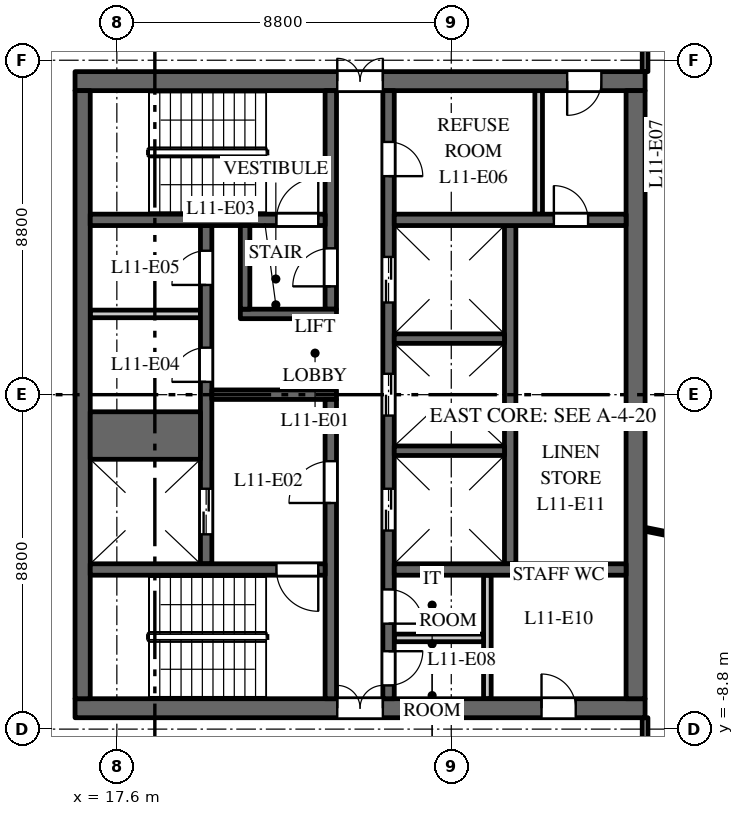
"""IFC4 building model, lengths in metres.
Left out: names, types, materials, properties, quantities, classifications, styles, units other than length and angle.
Written with IfcOpenShell. Run it as: python <this file> out.ifc"""

import sys

from ifc_helpers import new_model, si_unit, direction, frame, frame_2d, origin, place, context, subcontext, project, spatial, rectangle, extrude, element, fill, save


model = new_model("IFC4")
c1 = context("Model", 3, precision=1e-05, world=origin(), true_north=direction((0.0, 1.0)))
c2 = subcontext(c1, "Body", "Model", "MODEL_VIEW")
j1 = project(units=[si_unit("LENGTHUNIT", "METRE"), si_unit("PLANEANGLEUNIT", "RADIAN")], contexts=[c1])
p1 = place(None, origin())
s1 = spatial("IfcSite", under=j1, at=p1, CompositionType="ELEMENT")
p2 = place(p1, origin())
s2 = spatial("IfcBuilding", under=s1, at=p2, CompositionType="ELEMENT")
p3 = place(p2, frame((0.0, 0.0, 54.5)))
s3 = spatial("IfcBuildingStorey", under=s2, at=p3, CompositionType="ELEMENT", Elevation=54.5)
p4 = place(p3, frame((16.5, 8.25, 0.0), z_axis=(0.0, 0.0, 1.0), x_axis=(1.0, 0.0, 0.0)))
e1 = element("IfcWall", 1, at=p4, inside=s3, PredefinedType="SHEAR", context=c2, shape_type="SweptSolid", body=[
    extrude(rectangle(XDim=15.0, YDim=0.5, at=frame_2d((7.5, 0.0))), origin(), (0.0, 0.0, 1.0), 3.7),
])
p5 = place(p4, frame((6.9, 0.0, 0.0)))
e2 = element("IfcOpeningElement", 2, at=p5, cuts=e1, PredefinedType="OPENING", context=c2, shape_type="SweptSolid", body=[
    extrude(rectangle(XDim=1.2, YDim=2.1, at=frame_2d((0.6, 1.05))), frame((0.0, 0.26, 0.0), z_axis=(0.0, -1.0, 0.0), x_axis=(1.0, 0.0, 0.0)), (0.0, 0.0, 1.0), 0.52),
])
p6 = place(p4, frame((12.95, 0.0, 0.0)))
e3 = element("IfcOpeningElement", 3, at=p6, cuts=e1, PredefinedType="OPENING", context=c2, shape_type="SweptSolid", body=[
    extrude(rectangle(XDim=0.9, YDim=2.1, at=frame_2d((0.45, 1.05))), frame((0.0, 0.26, 0.0), z_axis=(0.0, -1.0, 0.0), x_axis=(1.0, 0.0, 0.0)), (0.0, 0.0, 1.0), 0.52),
])
p7 = place(p3, frame((16.5, -8.25, 0.0), z_axis=(0.0, 0.0, 1.0), x_axis=(1.0, 0.0, 0.0)))
e4 = element("IfcWall", 4, at=p7, inside=s3, PredefinedType="SHEAR", context=c2, shape_type="SweptSolid", body=[
    extrude(rectangle(XDim=15.0, YDim=0.5, at=frame_2d((7.5, 0.0))), origin(), (0.0, 0.0, 1.0), 3.7),
])
p8 = place(p7, frame((6.9, 0.0, 0.0)))
e5 = element("IfcOpeningElement", 5, at=p8, cuts=e4, PredefinedType="OPENING", context=c2, shape_type="SweptSolid", body=[
    extrude(rectangle(XDim=1.2, YDim=2.1, at=frame_2d((0.6, 1.05))), frame((0.0, 0.26, 0.0), z_axis=(0.0, -1.0, 0.0), x_axis=(1.0, 0.0, 0.0)), (0.0, 0.0, 1.0), 0.52),
])
p9 = place(p7, frame((12.275, 0.0, 0.0)))
e6 = element("IfcOpeningElement", 6, at=p9, cuts=e4, PredefinedType="OPENING", context=c2, shape_type="SweptSolid", body=[
    extrude(rectangle(XDim=0.9, YDim=2.1, at=frame_2d((0.45, 1.05))), frame((0.0, 0.26, 0.0), z_axis=(0.0, -1.0, 0.0), x_axis=(1.0, 0.0, 0.0)), (0.0, 0.0, 1.0), 0.52),
])
p10 = place(p3, frame((16.9, 2.125, 0.0), z_axis=(0.0, 0.0, 1.0), x_axis=(1.0, 0.0, 0.0)))
e7 = element("IfcWall", 7, at=p10, inside=s3, PredefinedType="PARTITIONING", context=c2, shape_type="SweptSolid", body=[
    extrude(rectangle(XDim=2.9, YDim=0.2, at=frame_2d((1.45, 0.0))), origin(), (0.0, 0.0, 1.0), 3.7),
])
p11 = place(p3, frame((27.95, -4.45, 0.0), z_axis=(0.0, 0.0, 1.0), x_axis=(0.0, 1.0, 0.0)))
e8 = element("IfcWall", 8, at=p11, inside=s3, PredefinedType="SHEAR", context=c2, shape_type="SweptSolid", body=[
    extrude(rectangle(XDim=8.9, YDim=0.3, at=frame_2d((4.45, 0.0))), origin(), (0.0, 0.0, 1.0), 3.7),
])
p12 = place(p3, frame((19.95, -4.45, 0.0), z_axis=(0.0, 0.0, 1.0), x_axis=(0.0, 1.0, 0.0)))
e9 = element("IfcWall", 9, at=p12, inside=s3, PredefinedType="SHEAR", context=c2, shape_type="SweptSolid", body=[
    extrude(rectangle(XDim=8.9, YDim=0.3, at=frame_2d((4.45, 0.0))), origin(), (0.0, 0.0, 1.0), 3.7),
])
p13 = place(p12, frame((0.775, 0.0, 0.0)))
e10 = element("IfcOpeningElement", 10, at=p13, cuts=e9, PredefinedType="OPENING", context=c2, shape_type="SweptSolid", body=[
    extrude(rectangle(XDim=1.2, YDim=2.1, at=frame_2d((0.6, 1.05))), frame((0.0, 0.16, 0.0), z_axis=(0.0, -1.0, 0.0), x_axis=(1.0, 0.0, 0.0)), (0.0, 0.0, 1.0), 0.32),
])
p14 = place(p12, frame((4.788, 0.0, 0.0)))
e11 = element("IfcOpeningElement", 11, at=p14, cuts=e9, PredefinedType="OPENING", context=c2, shape_type="SweptSolid", body=[
    extrude(rectangle(XDim=0.9, YDim=2.1, at=frame_2d((0.45, 1.05))), frame((0.0, 0.16, 0.0), z_axis=(0.0, -1.0, 0.0), x_axis=(1.0, 0.0, 0.0)), (0.0, 0.0, 1.0), 0.32),
])
p15 = place(p12, frame((7.337, 0.0, 0.0)))
e12 = element("IfcOpeningElement", 12, at=p15, cuts=e9, PredefinedType="OPENING", context=c2, shape_type="SweptSolid", body=[
    extrude(rectangle(XDim=0.9, YDim=2.1, at=frame_2d((0.45, 1.05))), frame((0.0, 0.16, 0.0), z_axis=(0.0, -1.0, 0.0), x_axis=(1.0, 0.0, 0.0)), (0.0, 0.0, 1.0), 0.32),
])
p16 = place(p3, frame((24.75, -8.0, 0.0), z_axis=(0.0, 0.0, 1.0), x_axis=(0.0, 1.0, 0.0)))
e13 = element("IfcWall", 13, at=p16, inside=s3, PredefinedType="SHEAR", context=c2, shape_type="SweptSolid", body=[
    extrude(rectangle(XDim=16.0, YDim=0.3, at=frame_2d((8.0, 0.0))), origin(), (0.0, 0.0, 1.0), 3.7),
])
p17 = place(p16, frame((4.425, 0.0, 0.0)))
e14 = element("IfcOpeningElement", 14, at=p17, cuts=e13, PredefinedType="OPENING", context=c2, shape_type="SweptSolid", body=[
    extrude(rectangle(XDim=1.1, YDim=2.1, at=frame_2d((0.55, 1.05))), frame((0.0, 0.16, 0.0), z_axis=(0.0, -1.0, 0.0), x_axis=(1.0, 0.0, 0.0)), (0.0, 0.0, 1.0), 0.32),
])
p18 = place(p16, frame((7.45, 0.0, 0.0)))
e15 = element("IfcOpeningElement", 15, at=p18, cuts=e13, PredefinedType="OPENING", context=c2, shape_type="SweptSolid", body=[
    extrude(rectangle(XDim=1.1, YDim=2.1, at=frame_2d((0.55, 1.05))), frame((0.0, 0.16, 0.0), z_axis=(0.0, -1.0, 0.0), x_axis=(1.0, 0.0, 0.0)), (0.0, 0.0, 1.0), 0.32),
])
p19 = place(p16, frame((10.425, 0.0, 0.0)))
e16 = element("IfcOpeningElement", 16, at=p19, cuts=e13, PredefinedType="OPENING", context=c2, shape_type="SweptSolid", body=[
    extrude(rectangle(XDim=1.2, YDim=2.1, at=frame_2d((0.6, 1.05))), frame((0.0, 0.16, 0.0), z_axis=(0.0, -1.0, 0.0), x_axis=(1.0, 0.0, 0.0)), (0.0, 0.0, 1.0), 0.32),
])
p20 = place(p16, frame((13.75, 0.0, 0.0)))
e17 = element("IfcOpeningElement", 17, at=p20, cuts=e13, PredefinedType="OPENING", context=c2, shape_type="SweptSolid", body=[
    extrude(rectangle(XDim=0.9, YDim=2.1, at=frame_2d((0.45, 1.05))), frame((0.0, 0.16, 0.0), z_axis=(0.0, -1.0, 0.0), x_axis=(1.0, 0.0, 0.0)), (0.0, 0.0, 1.0), 0.32),
])
p21 = place(p16, frame((1.975, 0.0, 0.0)))
e18 = element("IfcOpeningElement", 18, at=p21, cuts=e13, PredefinedType="OPENING", context=c2, shape_type="SweptSolid", body=[
    extrude(rectangle(XDim=0.9, YDim=2.1, at=frame_2d((0.45, 1.05))), frame((0.0, 0.16, 0.0), z_axis=(0.0, -1.0, 0.0), x_axis=(1.0, 0.0, 0.0)), (0.0, 0.0, 1.0), 0.32),
])
p22 = place(p16, frame((0.35, 0.0, 0.0)))
e19 = element("IfcOpeningElement", 19, at=p22, cuts=e13, PredefinedType="OPENING", context=c2, shape_type="SweptSolid", body=[
    extrude(rectangle(XDim=0.9, YDim=2.1, at=frame_2d((0.45, 1.05))), frame((0.0, 0.16, 0.0), z_axis=(0.0, -1.0, 0.0), x_axis=(1.0, 0.0, 0.0)), (0.0, 0.0, 1.0), 0.32),
])
p23 = place(p3, frame((20.1, 0.0, 0.0), z_axis=(0.0, 0.0, 1.0), x_axis=(1.0, 0.0, 0.0)))
e20 = element("IfcWall", 20, at=p23, inside=s3, PredefinedType="SHEAR", context=c2, shape_type="SweptSolid", body=[
    extrude(rectangle(XDim=3.28, YDim=0.25, at=frame_2d((1.64, 0.0))), origin(), (0.0, 0.0, 1.0), 3.7),
])
p24 = place(p3, frame((16.7, -8.0, 0.0), z_axis=(0.0, 0.0, 1.0), x_axis=(0.0, 1.0, 0.0)))
e21 = element("IfcWall", 21, at=p24, inside=s3, PredefinedType="SHEAR", context=c2, shape_type="SweptSolid", body=[
    extrude(rectangle(XDim=16.0, YDim=0.4, at=frame_2d((8.0, 0.0))), origin(), (0.0, 0.0, 1.0), 3.7),
])
p25 = place(p3, frame((31.25, -8.0, 0.0), z_axis=(0.0, 0.0, 1.0), x_axis=(0.0, 1.0, 0.0)))
e22 = element("IfcWall", 22, at=p25, inside=s3, PredefinedType="SHEAR", context=c2, shape_type="SweptSolid", body=[
    extrude(rectangle(XDim=16.0, YDim=0.5, at=frame_2d((8.0, 0.0))), origin(), (0.0, 0.0, 1.0), 3.7),
])
p26 = place(p3, frame((24.9, 4.6, 0.0), z_axis=(0.0, 0.0, 1.0), x_axis=(1.0, 0.0, 0.0)))
e23 = element("IfcWall", 23, at=p26, inside=s3, PredefinedType="SHEAR", context=c2, shape_type="SweptSolid", body=[
    extrude(rectangle(XDim=6.1, YDim=0.3, at=frame_2d((3.05, 0.0))), origin(), (0.0, 0.0, 1.0), 3.7),
])
p27 = place(p26, frame((4.2, 0.0, 0.0)))
e24 = element("IfcOpeningElement", 24, at=p27, cuts=e23, PredefinedType="OPENING", context=c2, shape_type="SweptSolid", body=[
    extrude(rectangle(XDim=0.9, YDim=2.1, at=frame_2d((0.45, 1.05))), frame((0.0, 0.16, 0.0), z_axis=(0.0, -1.0, 0.0), x_axis=(1.0, 0.0, 0.0)), (0.0, 0.0, 1.0), 0.32),
])
for number, where, z_axis, x_axis in (
    (25, (28.7, 4.75, 0.0), (0.0, 0.0, 1.0), (0.0, 1.0, 0.0)),
    (26, (27.35, -8.0, 0.0), (0.0, 0.0, 1.0), (0.0, 1.0, 0.0)),
):
    element("IfcWall", number, at=place(p3, frame(where, z_axis=z_axis, x_axis=x_axis)), inside=s3, PredefinedType="PARTITIONING", context=c2, shape_type="SweptSolid", body=[
        extrude(rectangle(XDim=3.25, YDim=0.2, at=frame_2d((1.625, 0.0))), origin(), (0.0, 0.0, 1.0), 3.7),
    ])
p28 = place(p3, frame((24.9, -6.4, 0.0), z_axis=(0.0, 0.0, 1.0), x_axis=(1.0, 0.0, 0.0)))
e27 = element("IfcWall", 27, at=p28, inside=s3, PredefinedType="PARTITIONING", context=c2, shape_type="SweptSolid", body=[
    extrude(rectangle(XDim=2.35, YDim=0.2, at=frame_2d((1.175, 0.0))), origin(), (0.0, 0.0, 1.0), 3.7),
])
p29 = place(p3, frame((24.9, -4.6, 0.0), z_axis=(0.0, 0.0, 1.0), x_axis=(1.0, 0.0, 0.0)))
e28 = element("IfcWall", 28, at=p29, inside=s3, PredefinedType="SHEAR", context=c2, shape_type="SweptSolid", body=[
    extrude(rectangle(XDim=6.1, YDim=0.3, at=frame_2d((3.05, 0.0))), origin(), (0.0, 0.0, 1.0), 3.7),
])
p30 = place(p3, frame((16.9, -1.075, 0.0), z_axis=(0.0, 0.0, 1.0), x_axis=(1.0, 0.0, 0.0)))
e29 = element("IfcWall", 29, at=p30, inside=s3, PredefinedType="SHEAR", context=c2, shape_type="SweptSolid", body=[
    extrude(rectangle(XDim=2.9, YDim=1.25, at=frame_2d((1.45, 0.0))), origin(), (0.0, 0.0, 1.0), 3.7),
])
for number, where, z_axis, x_axis in (
    (30, (24.9, -1.475, 0.0), (0.0, 0.0, 1.0), (1.0, 0.0, 0.0)),
    (31, (24.9, 1.475, 0.0), (0.0, 0.0, 1.0), (1.0, 0.0, 0.0)),
):
    element("IfcWall", number, at=place(p3, frame(where, z_axis=z_axis, x_axis=x_axis)), inside=s3, PredefinedType="SHEAR", context=c2, shape_type="SweptSolid", body=[
        extrude(rectangle(XDim=2.9, YDim=0.25, at=frame_2d((1.45, 0.0))), origin(), (0.0, 0.0, 1.0), 3.7),
    ])
p31 = place(p3, frame((23.23, 2.25, 0.0), z_axis=(0.0, 0.0, 1.0), x_axis=(0.0, 1.0, 0.0)))
e32 = element("IfcWall", 32, at=p31, inside=s3, PredefinedType="SHEAR", context=c2, shape_type="SweptSolid", body=[
    extrude(rectangle(XDim=5.75, YDim=0.3, at=frame_2d((2.875, 0.0))), origin(), (0.0, 0.0, 1.0), 3.7),
])
p32 = place(p31, frame((0.6, 0.0, 0.0)))
e33 = element("IfcOpeningElement", 33, at=p32, cuts=e32, PredefinedType="OPENING", context=c2, shape_type="SweptSolid", body=[
    extrude(rectangle(XDim=1.0, YDim=2.1, at=frame_2d((0.5, 1.05))), frame((0.0, 0.16, 0.0), z_axis=(0.0, -1.0, 0.0), x_axis=(1.0, 0.0, 0.0)), (0.0, 0.0, 1.0), 0.32),
])
p33 = place(p3, frame((23.23, -8.0, 0.0), z_axis=(0.0, 0.0, 1.0), x_axis=(0.0, 1.0, 0.0)))
e34 = element("IfcWall", 34, at=p33, inside=s3, PredefinedType="SHEAR", context=c2, shape_type="SweptSolid", body=[
    extrude(rectangle(XDim=7.875, YDim=0.3, at=frame_2d((3.938, 0.0))), origin(), (0.0, 0.0, 1.0), 3.7),
])
p34 = place(p33, frame((5.15, 0.0, 0.0)))
e35 = element("IfcOpeningElement", 35, at=p34, cuts=e34, PredefinedType="OPENING", context=c2, shape_type="SweptSolid", body=[
    extrude(rectangle(XDim=1.1, YDim=2.1, at=frame_2d((0.55, 1.05))), frame((0.0, 0.16, 0.0), z_axis=(0.0, -1.0, 0.0), x_axis=(1.0, 0.0, 0.0)), (0.0, 0.0, 1.0), 0.32),
])
p35 = place(p3, frame((16.9, 4.6, 0.0), z_axis=(0.0, 0.0, 1.0), x_axis=(1.0, 0.0, 0.0)))
e36 = element("IfcWall", 36, at=p35, inside=s3, PredefinedType="SHEAR", context=c2, shape_type="SweptSolid", body=[
    extrude(rectangle(XDim=6.18, YDim=0.3, at=frame_2d((3.09, 0.0))), origin(), (0.0, 0.0, 1.0), 3.7),
])
p36 = place(p35, frame((4.9, 0.0, 0.0)))
e37 = element("IfcOpeningElement", 37, at=p36, cuts=e36, PredefinedType="OPENING", context=c2, shape_type="SweptSolid", body=[
    extrude(rectangle(XDim=1.1, YDim=2.1, at=frame_2d((0.55, 1.05))), frame((0.0, 0.16, 0.0), z_axis=(0.0, -1.0, 0.0), x_axis=(1.0, 0.0, 0.0)), (0.0, 0.0, 1.0), 0.32),
])
p37 = place(p3, frame((16.9, -4.6, 0.0), z_axis=(0.0, 0.0, 1.0), x_axis=(1.0, 0.0, 0.0)))
e38 = element("IfcWall", 38, at=p37, inside=s3, PredefinedType="SHEAR", context=c2, shape_type="SweptSolid", body=[
    extrude(rectangle(XDim=6.18, YDim=0.3, at=frame_2d((3.09, 0.0))), origin(), (0.0, 0.0, 1.0), 3.7),
])
p38 = place(p37, frame((4.9, 0.0, 0.0)))
e39 = element("IfcOpeningElement", 39, at=p38, cuts=e38, PredefinedType="OPENING", context=c2, shape_type="SweptSolid", body=[
    extrude(rectangle(XDim=1.1, YDim=2.1, at=frame_2d((0.55, 1.05))), frame((0.0, 0.16, 0.0), z_axis=(0.0, -1.0, 0.0), x_axis=(1.0, 0.0, 0.0)), (0.0, 0.0, 1.0), 0.32),
])
p39 = place(p3, frame((20.85, 2.125, 0.0), z_axis=(0.0, 0.0, 1.0), x_axis=(1.0, 0.0, 0.0)))
e40 = element("IfcWall", 40, at=p39, inside=s3, PredefinedType="SHEAR", context=c2, shape_type="SweptSolid", body=[
    extrude(rectangle(XDim=2.53, YDim=0.25, at=frame_2d((1.265, 0.0))), origin(), (0.0, 0.0, 1.0), 3.7),
])
p40 = place(p3, frame((20.975, 2.25, 0.0), z_axis=(0.0, 0.0, 1.0), x_axis=(0.0, 1.0, 0.0)))
e41 = element("IfcWall", 41, at=p40, inside=s3, PredefinedType="SHEAR", context=c2, shape_type="SweptSolid", body=[
    extrude(rectangle(XDim=2.2, YDim=0.25, at=frame_2d((1.1, 0.0))), origin(), (0.0, 0.0, 1.0), 3.7),
])
p41 = place(p3, frame((31.5, -10.7, 0.0), z_axis=(0.0, 0.0, 1.0), x_axis=(0.0, 1.0, 0.0)))
e42 = element("IfcWall", 42, at=p41, inside=s3, PredefinedType="PARTITIONING", context=c2, shape_type="SweptSolid", body=[
    extrude(rectangle(XDim=2.2, YDim=0.15, at=frame_2d((1.1, 0.0))), origin(), (0.0, 0.0, 1.0), 2.85),
])
p42 = place(p3, frame((31.5, -3.542, 0.0), z_axis=(0.0, 0.0, 1.0), x_axis=(0.980357474535, -0.197228857227, 0.0)))
e43 = element("IfcWall", 43, at=p42, inside=s3, PredefinedType="PARTITIONING", context=c2, shape_type="SweptSolid", body=[
    extrude(rectangle(XDim=4.092, YDim=0.1, at=frame_2d((2.046, 0.0))), origin(), (0.0, 0.0, 1.0), 2.85),
])
p43 = place(p3, frame((31.5, 8.5, 0.0), z_axis=(0.0, 0.0, 1.0), x_axis=(0.0, 1.0, 0.0)))
e44 = element("IfcWall", 44, at=p43, inside=s3, PredefinedType="PARTITIONING", context=c2, shape_type="SweptSolid", body=[
    extrude(rectangle(XDim=2.2, YDim=0.15, at=frame_2d((1.1, 0.0))), origin(), (0.0, 0.0, 1.0), 2.85),
])
p44 = place(p43, frame((0.65, 0.0, 0.0)))
e45 = element("IfcOpeningElement", 45, at=p44, cuts=e44, PredefinedType="OPENING", context=c2, shape_type="SweptSolid", body=[
    extrude(rectangle(XDim=1.0, YDim=2.1, at=frame_2d((0.5, 1.05))), frame((0.0, 0.085, 0.0), z_axis=(0.0, -1.0, 0.0), x_axis=(1.0, 0.0, 0.0)), (0.0, 0.0, 1.0), 0.17),
])
p45 = place(p13, origin())
e46 = element("IfcDoor", 46, at=p45, inside=s3, OperationType="DOUBLE_DOOR_SLIDING", PredefinedType="DOOR", context=c2, shape_type="SweptSolid", body=[
    extrude(rectangle(XDim=1.2, YDim=2.1, at=frame_2d((0.6, 1.05))), frame((0.0, 0.025, 0.0), z_axis=(0.0, -1.0, 0.0), x_axis=(1.0, 0.0, 0.0)), (0.0, 0.0, 1.0), 0.05),
])
fill(e10, e46)
p46 = place(p17, origin())
e47 = element("IfcDoor", 47, at=p46, inside=s3, OperationType="DOUBLE_DOOR_SLIDING", PredefinedType="DOOR", context=c2, shape_type="SweptSolid", body=[
    extrude(rectangle(XDim=1.1, YDim=2.1, at=frame_2d((0.55, 1.05))), frame((0.0, 0.025, 0.0), z_axis=(0.0, -1.0, 0.0), x_axis=(1.0, 0.0, 0.0)), (0.0, 0.0, 1.0), 0.05),
])
fill(e14, e47)
p47 = place(p18, origin())
e48 = element("IfcDoor", 48, at=p47, inside=s3, OperationType="DOUBLE_DOOR_SLIDING", PredefinedType="DOOR", context=c2, shape_type="SweptSolid", body=[
    extrude(rectangle(XDim=1.1, YDim=2.1, at=frame_2d((0.55, 1.05))), frame((0.0, 0.025, 0.0), z_axis=(0.0, -1.0, 0.0), x_axis=(1.0, 0.0, 0.0)), (0.0, 0.0, 1.0), 0.05),
])
fill(e15, e48)
p48 = place(p19, origin())
e49 = element("IfcDoor", 49, at=p48, inside=s3, OperationType="DOUBLE_DOOR_SLIDING", PredefinedType="DOOR", context=c2, shape_type="SweptSolid", body=[
    extrude(rectangle(XDim=1.2, YDim=2.1, at=frame_2d((0.6, 1.05))), frame((0.0, 0.025, 0.0), z_axis=(0.0, -1.0, 0.0), x_axis=(1.0, 0.0, 0.0)), (0.0, 0.0, 1.0), 0.05),
])
fill(e16, e49)
p49 = place(p36, origin())
e50 = element("IfcDoor", 50, at=p49, inside=s3, OperationType="SINGLE_SWING_LEFT", PredefinedType="DOOR", context=c2, shape_type="SweptSolid", body=[
    extrude(rectangle(XDim=1.1, YDim=2.1, at=frame_2d((0.55, 1.05))), frame((0.0, 0.025, 0.0), z_axis=(0.0, -1.0, 0.0), x_axis=(1.0, 0.0, 0.0)), (0.0, 0.0, 1.0), 0.05),
])
fill(e37, e50)
p50 = place(p38, origin())
e51 = element("IfcDoor", 51, at=p50, inside=s3, OperationType="SINGLE_SWING_RIGHT", PredefinedType="DOOR", context=c2, shape_type="SweptSolid", body=[
    extrude(rectangle(XDim=1.1, YDim=2.1, at=frame_2d((0.55, 1.05))), frame((0.0, 0.025, 0.0), z_axis=(0.0, -1.0, 0.0), x_axis=(1.0, 0.0, 0.0)), (0.0, 0.0, 1.0), 0.05),
])
fill(e39, e51)
p51 = place(p34, origin())
e52 = element("IfcDoor", 52, at=p51, inside=s3, OperationType="SINGLE_SWING_RIGHT", PredefinedType="DOOR", context=c2, shape_type="SweptSolid", body=[
    extrude(rectangle(XDim=1.1, YDim=2.1, at=frame_2d((0.55, 1.05))), frame((0.0, 0.025, 0.0), z_axis=(0.0, -1.0, 0.0), x_axis=(1.0, 0.0, 0.0)), (0.0, 0.0, 1.0), 0.05),
])
fill(e35, e52)
p52 = place(p32, origin())
e53 = element("IfcDoor", 53, at=p52, inside=s3, OperationType="SINGLE_SWING_RIGHT", PredefinedType="DOOR", context=c2, shape_type="SweptSolid", body=[
    extrude(rectangle(XDim=1.0, YDim=2.1, at=frame_2d((0.5, 1.05))), frame((0.0, 0.025, 0.0), z_axis=(0.0, -1.0, 0.0), x_axis=(1.0, 0.0, 0.0)), (0.0, 0.0, 1.0), 0.05),
])
fill(e33, e53)
p53 = place(p5, origin())
e54 = element("IfcDoor", 54, at=p53, inside=s3, OperationType="DOUBLE_DOOR_DOUBLE_SWING", PredefinedType="DOOR", context=c2, shape_type="SweptSolid", body=[
    extrude(rectangle(XDim=1.2, YDim=2.1, at=frame_2d((0.6, 1.05))), frame((0.0, 0.025, 0.0), z_axis=(0.0, -1.0, 0.0), x_axis=(1.0, 0.0, 0.0)), (0.0, 0.0, 1.0), 0.05),
])
fill(e2, e54)
p54 = place(p8, origin())
e55 = element("IfcDoor", 55, at=p54, inside=s3, OperationType="DOUBLE_DOOR_DOUBLE_SWING", PredefinedType="DOOR", context=c2, shape_type="SweptSolid", body=[
    extrude(rectangle(XDim=1.2, YDim=2.1, at=frame_2d((0.6, 1.05))), frame((0.0, 0.025, 0.0), z_axis=(0.0, -1.0, 0.0), x_axis=(1.0, 0.0, 0.0)), (0.0, 0.0, 1.0), 0.05),
])
fill(e5, e55)
p55 = place(p14, origin())
e56 = element("IfcDoor", 56, at=p55, inside=s3, OperationType="SINGLE_SWING_RIGHT", PredefinedType="DOOR", context=c2, shape_type="SweptSolid", body=[
    extrude(rectangle(XDim=0.9, YDim=2.1, at=frame_2d((0.45, 1.05))), frame((0.0, 0.025, 0.0), z_axis=(0.0, -1.0, 0.0), x_axis=(1.0, 0.0, 0.0)), (0.0, 0.0, 1.0), 0.05),
])
fill(e11, e56)
p56 = place(p15, origin())
e57 = element("IfcDoor", 57, at=p56, inside=s3, OperationType="SINGLE_SWING_RIGHT", PredefinedType="DOOR", context=c2, shape_type="SweptSolid", body=[
    extrude(rectangle(XDim=0.9, YDim=2.1, at=frame_2d((0.45, 1.05))), frame((0.0, 0.025, 0.0), z_axis=(0.0, -1.0, 0.0), x_axis=(1.0, 0.0, 0.0)), (0.0, 0.0, 1.0), 0.05),
])
fill(e12, e57)
p57 = place(p20, origin())
e58 = element("IfcDoor", 58, at=p57, inside=s3, OperationType="SINGLE_SWING_LEFT", PredefinedType="DOOR", context=c2, shape_type="SweptSolid", body=[
    extrude(rectangle(XDim=0.9, YDim=2.1, at=frame_2d((0.45, 1.05))), frame((0.0, 0.025, 0.0), z_axis=(0.0, -1.0, 0.0), x_axis=(1.0, 0.0, 0.0)), (0.0, 0.0, 1.0), 0.05),
])
fill(e17, e58)
p58 = place(p6, origin())
e59 = element("IfcDoor", 59, at=p58, inside=s3, OperationType="SINGLE_SWING_LEFT", PredefinedType="DOOR", context=c2, shape_type="SweptSolid", body=[
    extrude(rectangle(XDim=0.9, YDim=2.1, at=frame_2d((0.45, 1.05))), frame((0.0, 0.025, 0.0), z_axis=(0.0, -1.0, 0.0), x_axis=(1.0, 0.0, 0.0)), (0.0, 0.0, 1.0), 0.05),
])
fill(e3, e59)
p59 = place(p21, origin())
e60 = element("IfcDoor", 60, at=p59, inside=s3, OperationType="SINGLE_SWING_LEFT", PredefinedType="DOOR", context=c2, shape_type="SweptSolid", body=[
    extrude(rectangle(XDim=0.9, YDim=2.1, at=frame_2d((0.45, 1.05))), frame((0.0, 0.025, 0.0), z_axis=(0.0, -1.0, 0.0), x_axis=(1.0, 0.0, 0.0)), (0.0, 0.0, 1.0), 0.05),
])
fill(e18, e60)
p60 = place(p22, origin())
e61 = element("IfcDoor", 61, at=p60, inside=s3, OperationType="SINGLE_SWING_RIGHT", PredefinedType="DOOR", context=c2, shape_type="SweptSolid", body=[
    extrude(rectangle(XDim=0.9, YDim=2.1, at=frame_2d((0.45, 1.05))), frame((0.0, 0.025, 0.0), z_axis=(0.0, -1.0, 0.0), x_axis=(1.0, 0.0, 0.0)), (0.0, 0.0, 1.0), 0.05),
])
fill(e19, e61)
p61 = place(p9, origin())
e62 = element("IfcDoor", 62, at=p61, inside=s3, OperationType="SINGLE_SWING_RIGHT", PredefinedType="DOOR", context=c2, shape_type="SweptSolid", body=[
    extrude(rectangle(XDim=0.9, YDim=2.1, at=frame_2d((0.45, 1.05))), frame((0.0, 0.025, 0.0), z_axis=(0.0, -1.0, 0.0), x_axis=(1.0, 0.0, 0.0)), (0.0, 0.0, 1.0), 0.05),
])
fill(e6, e62)
p62 = place(p27, origin())
e63 = element("IfcDoor", 63, at=p62, inside=s3, OperationType="SINGLE_SWING_RIGHT", PredefinedType="DOOR", context=c2, shape_type="SweptSolid", body=[
    extrude(rectangle(XDim=0.9, YDim=2.1, at=frame_2d((0.45, 1.05))), frame((0.0, 0.025, 0.0), z_axis=(0.0, -1.0, 0.0), x_axis=(1.0, 0.0, 0.0)), (0.0, 0.0, 1.0), 0.05),
])
fill(e24, e63)
save(model, sys.argv[1])
